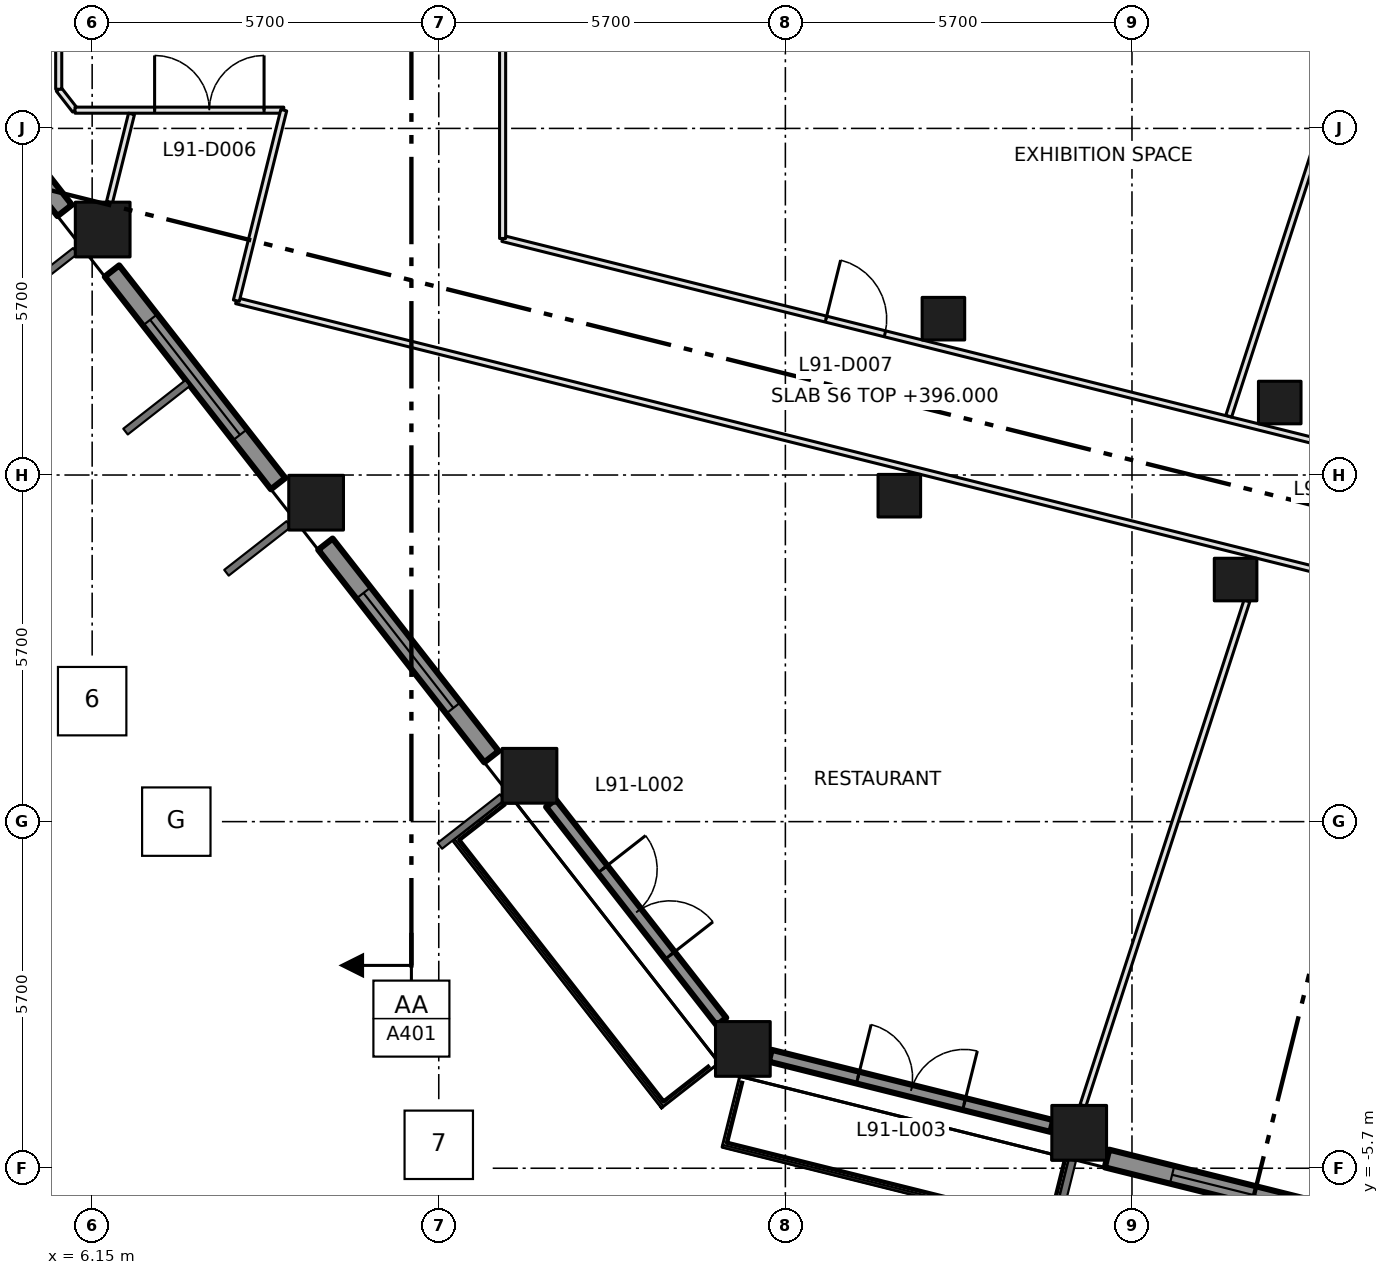
"""IFC4 building model, lengths in metres.
Left out: names, types, materials, properties, quantities, classifications, styles, units other than length and angle.
Written with IfcOpenShell. Run it as: python <this file> out.ifc"""

import sys

from ifc_helpers import new_model, si_unit, direction, frame, frame_2d, origin, origin_2d, place, context, subcontext, project, spatial, rectangle, extrude, element, fill, save


model = new_model("IFC4")
c1 = context("Model", 3, precision=1e-05, world=origin(), true_north=direction((0.0, 1.0)))
c2 = subcontext(c1, "Body", "Model", "MODEL_VIEW")
j1 = project(units=[si_unit("LENGTHUNIT", "METRE"), si_unit("PLANEANGLEUNIT", "RADIAN")], contexts=[c1])
p1 = place(None, origin())
s1 = spatial("IfcSite", under=j1, at=p1, CompositionType="ELEMENT")
p2 = place(p1, origin())
s2 = spatial("IfcBuilding", under=s1, at=p2, CompositionType="ELEMENT")
p3 = place(p2, frame((0.0, 0.0, 396.0)))
s3 = spatial("IfcBuildingStorey", under=s2, at=p3, CompositionType="ELEMENT", Elevation=396.0)
for number, where, z_axis, x_axis in (
    (1, (16.851, -3.738, 0.0), (0.0, 0.0, 1.0), (1.0, 0.0, 0.0)),
    (2, (13.342, 0.754, 0.0), (0.0, 0.0, 1.0), (1.0, 0.0, 0.0)),
    (3, (9.833, 5.245, 0.0), (0.0, 0.0, 1.0), (1.0, 0.0, 0.0)),
    (4, (6.323, 9.737, 0.0), (0.0, 0.0, 1.0), (1.0, 0.0, 0.0)),
    (5, (22.382, -5.117, 0.0), (0.0, 0.0, 1.0), (1.0, 0.0, 0.0)),
):
    element("IfcColumn", number, at=place(p3, frame(where, z_axis=z_axis, x_axis=x_axis)), inside=s3, PredefinedType="COLUMN", context=c2, shape_type="SweptSolid", body=[
        extrude(rectangle(XDim=0.9, YDim=0.9, at=origin_2d()), origin(), (0.0, 0.0, 1.0), 4.2),
    ])
for number, where, z_axis, x_axis in (
    (6, (19.424, 5.36, 0.0), (0.0, 0.0, 1.0), (1.0, 0.0, 0.0)),
    (7, (24.954, 3.981, 0.0), (0.0, 0.0, 1.0), (1.0, 0.0, 0.0)),
    (8, (20.149, 8.271, 0.0), (0.0, 0.0, 1.0), (1.0, 0.0, 0.0)),
    (9, (25.68, 6.892, 0.0), (0.0, 0.0, 1.0), (1.0, 0.0, 0.0)),
):
    element("IfcColumn", number, at=place(p3, frame(where, z_axis=z_axis, x_axis=x_axis)), inside=s3, PredefinedType="COLUMN", context=c2, shape_type="SweptSolid", body=[
        extrude(rectangle(XDim=0.7, YDim=0.7, at=origin_2d()), origin(), (0.0, 0.0, 1.0), 4.2),
    ])
p4 = place(p3, frame((2.967, 13.547, 0.0), z_axis=(0.0, 0.0, 1.0), x_axis=(0.615486001463, -0.788147817356, 0.0)))
e10 = element("IfcWall", 10, at=p4, inside=s3, PredefinedType="SOLIDWALL", context=c2, shape_type="SweptSolid", body=[
    extrude(rectangle(XDim=4.437, YDim=0.3, at=frame_2d((2.219, 0.0))), origin(), (0.0, 0.0, 1.0), 3.05),
])
p5 = place(p4, frame((1.018, 0.0, 0.8)))
e11 = element("IfcOpeningElement", 11, at=p5, cuts=e10, PredefinedType="OPENING", context=c2, shape_type="SweptSolid", body=[
    extrude(rectangle(XDim=2.4, YDim=1.45, at=frame_2d((1.2, 0.725))), frame((0.0, 0.16, 0.0), z_axis=(0.0, -1.0, 0.0), x_axis=(1.0, 0.0, 0.0)), (0.0, 0.0, 1.0), 0.32),
])
p6 = place(p3, frame((6.476, 9.055, 0.0), z_axis=(0.0, 0.0, 1.0), x_axis=(0.615649380255, -0.788020203162, 0.0)))
e12 = element("IfcWall", 12, at=p6, inside=s3, PredefinedType="SOLIDWALL", context=c2, shape_type="SweptSolid", body=[
    extrude(rectangle(XDim=4.438, YDim=0.3, at=frame_2d((2.219, 0.0))), origin(), (0.0, 0.0, 1.0), 3.05),
])
p7 = place(p6, frame((1.019, 0.0, 0.8)))
e13 = element("IfcOpeningElement", 13, at=p7, cuts=e12, PredefinedType="OPENING", context=c2, shape_type="SweptSolid", body=[
    extrude(rectangle(XDim=2.4, YDim=1.45, at=frame_2d((1.2, 0.725))), frame((0.0, 0.16, 0.0), z_axis=(0.0, -1.0, 0.0), x_axis=(1.0, 0.0, 0.0)), (0.0, 0.0, 1.0), 0.32),
])
p8 = place(p3, frame((9.986, 4.563, 0.0), z_axis=(0.0, 0.0, 1.0), x_axis=(0.615592779411, -0.788064419915, 0.0)))
e14 = element("IfcWall", 14, at=p8, inside=s3, PredefinedType="SOLIDWALL", context=c2, shape_type="SweptSolid", body=[
    extrude(rectangle(XDim=4.436, YDim=0.3, at=frame_2d((2.218, 0.0))), origin(), (0.0, 0.0, 1.0), 3.05),
])
p9 = place(p8, frame((1.018, 0.0, 0.8)))
e15 = element("IfcOpeningElement", 15, at=p9, cuts=e14, PredefinedType="OPENING", context=c2, shape_type="SweptSolid", body=[
    extrude(rectangle(XDim=2.4, YDim=1.45, at=frame_2d((1.2, 0.725))), frame((0.0, 0.16, 0.0), z_axis=(0.0, -1.0, 0.0), x_axis=(1.0, 0.0, 0.0)), (0.0, 0.0, 1.0), 0.32),
])
p10 = place(p3, frame((13.694, 0.304, 0.0), z_axis=(0.0, 0.0, 1.0), x_axis=(0.615460024179, -0.788168103033, 0.0)))
e16 = element("IfcWall", 16, at=p10, inside=s3, PredefinedType="SOLIDWALL", context=c2, shape_type="SweptSolid", body=[
    extrude(rectangle(XDim=4.557, YDim=0.2, at=frame_2d((2.279, 0.0))), origin(), (0.0, 0.0, 1.0), 3.05),
])
p11 = place(p10, frame((1.379, 0.0, 0.0)))
e17 = element("IfcOpeningElement", 17, at=p11, cuts=e16, PredefinedType="OPENING", context=c2, shape_type="SweptSolid", body=[
    extrude(rectangle(XDim=1.8, YDim=2.9, at=frame_2d((0.9, 1.45))), frame((0.0, 0.11, 0.0), z_axis=(0.0, -1.0, 0.0), x_axis=(1.0, 0.0, 0.0)), (0.0, 0.0, 1.0), 0.22),
])
p12 = place(p3, frame((12.398, -0.199, 0.0), z_axis=(0.0, 0.0, 1.0), x_axis=(0.615638738903, -0.788028516719, 0.0)))
e18 = element("IfcWall", 18, at=p12, inside=s3, PredefinedType="SOLIDWALL", context=c2, shape_type="SweptSolid", body=[
    extrude(rectangle(XDim=5.36, YDim=0.4, at=frame_2d((2.68, 0.0))), origin(), (0.0, 0.0, 1.0), 0.3),
])
p13 = place(p3, frame((17.301, -3.85, 0.0), z_axis=(0.0, 0.0, 1.0), x_axis=(0.970286762598, -0.241957844111, 0.0)))
e19 = element("IfcWall", 19, at=p13, inside=s3, PredefinedType="SOLIDWALL", context=c2, shape_type="SweptSolid", body=[
    extrude(rectangle(XDim=4.773, YDim=0.2, at=frame_2d((2.386, 0.0))), origin(), (0.0, 0.0, 1.0), 3.05),
])
p14 = place(p13, frame((1.486, 0.0, 0.0)))
e20 = element("IfcOpeningElement", 20, at=p14, cuts=e19, PredefinedType="OPENING", context=c2, shape_type="SweptSolid", body=[
    extrude(rectangle(XDim=1.8, YDim=2.9, at=frame_2d((0.9, 1.45))), frame((0.0, 0.11, 0.0), z_axis=(0.0, -1.0, 0.0), x_axis=(1.0, 0.0, 0.0)), (0.0, 0.0, 1.0), 0.22),
])
p15 = place(p3, frame((16.694, -5.069, 0.0), z_axis=(0.0, 0.0, 1.0), x_axis=(0.970289679319, -0.241946147329, 0.0)))
e21 = element("IfcWall", 21, at=p15, inside=s3, PredefinedType="SOLIDWALL", context=c2, shape_type="SweptSolid", body=[
    extrude(rectangle(XDim=5.36, YDim=0.4, at=frame_2d((2.68, 0.0))), origin(), (0.0, 0.0, 1.0), 0.3),
])
p16 = place(p3, frame((22.839, -5.54, 0.0), z_axis=(0.0, 0.0, 1.0), x_axis=(0.970282587769, -0.241974585177, 0.0)))
e22 = element("IfcWall", 22, at=p16, inside=s3, PredefinedType="SOLIDWALL", context=c2, shape_type="SweptSolid", body=[
    extrude(rectangle(XDim=4.608, YDim=0.3, at=frame_2d((2.304, 0.0))), origin(), (0.0, 0.0, 1.0), 3.05),
])
p17 = place(p16, frame((1.104, 0.0, 0.8)))
e23 = element("IfcOpeningElement", 23, at=p17, cuts=e22, PredefinedType="OPENING", context=c2, shape_type="SweptSolid", body=[
    extrude(rectangle(XDim=2.4, YDim=1.45, at=frame_2d((1.2, 0.725))), frame((0.0, 0.16, 0.0), z_axis=(0.0, -1.0, 0.0), x_axis=(1.0, 0.0, 0.0)), (0.0, 0.0, 1.0), 0.32),
])
p18 = place(p3, frame((5.6, 12.044, 0.0), z_axis=(0.0, 0.0, 1.0), x_axis=(0.614328236968, -0.789050579661, 0.0)))
e24 = element("IfcWall", 24, at=p18, inside=s3, PredefinedType="PARTITIONING", context=c2, shape_type="SweptSolid", body=[
    extrude(rectangle(XDim=0.436, YDim=0.1, at=frame_2d((0.218, 0.0))), origin(), (0.0, 0.0, 1.0), 3.75),
])
p19 = place(p3, frame((5.6, 39.77, 0.0), z_axis=(0.0, 0.0, 1.0), x_axis=(0.0, -1.0, 0.0)))
e25 = element("IfcWall", 25, at=p19, inside=s3, PredefinedType="PARTITIONING", context=c2, shape_type="SweptSolid", body=[
    extrude(rectangle(XDim=27.726, YDim=0.1, at=frame_2d((13.863, 0.0))), origin(), (0.0, 0.0, 1.0), 3.75),
])
p20 = place(p19, frame((24.295, 0.0, 0.0)))
e26 = element("IfcOpeningElement", 26, at=p20, cuts=e25, PredefinedType="OPENING", context=c2, shape_type="SweptSolid", body=[
    extrude(rectangle(XDim=1.0, YDim=2.1, at=frame_2d((0.5, 1.05))), frame((0.0, 0.06, 0.0), z_axis=(0.0, -1.0, 0.0), x_axis=(1.0, 0.0, 0.0)), (0.0, 0.0, 1.0), 0.12),
])
p21 = place(p19, frame((16.395, 0.0, 0.0)))
e27 = element("IfcOpeningElement", 27, at=p21, cuts=e25, PredefinedType="OPENING", context=c2, shape_type="SweptSolid", body=[
    extrude(rectangle(XDim=1.0, YDim=2.1, at=frame_2d((0.5, 1.05))), frame((0.0, 0.06, 0.0), z_axis=(0.0, -1.0, 0.0), x_axis=(1.0, 0.0, 0.0)), (0.0, 0.0, 1.0), 0.12),
])
p22 = place(p19, frame((7.995, 0.0, 0.0)))
e28 = element("IfcOpeningElement", 28, at=p22, cuts=e25, PredefinedType="OPENING", context=c2, shape_type="SweptSolid", body=[
    extrude(rectangle(XDim=1.0, YDim=2.1, at=frame_2d((0.5, 1.05))), frame((0.0, 0.06, 0.0), z_axis=(0.0, -1.0, 0.0), x_axis=(1.0, 0.0, 0.0)), (0.0, 0.0, 1.0), 0.12),
])
p23 = place(p19, frame((2.38, 0.0, 0.0)))
e29 = element("IfcOpeningElement", 29, at=p23, cuts=e25, PredefinedType="OPENING", context=c2, shape_type="SweptSolid", body=[
    extrude(rectangle(XDim=1.0, YDim=2.1, at=frame_2d((0.5, 1.05))), frame((0.0, 0.06, 0.0), z_axis=(0.0, -1.0, 0.0), x_axis=(1.0, 0.0, 0.0)), (0.0, 0.0, 1.0), 0.12),
])
p24 = place(p3, frame((5.868, 11.7, 0.0), z_axis=(0.0, 0.0, 1.0), x_axis=(1.0, 0.0, 0.0)))
e30 = element("IfcWall", 30, at=p24, inside=s3, PredefinedType="PARTITIONING", context=c2, shape_type="SweptSolid", body=[
    extrude(rectangle(XDim=3.433, YDim=0.1, at=frame_2d((1.717, 0.0))), origin(), (0.0, 0.0, 1.0), 3.75),
])
p25 = place(p24, frame((1.309, 0.0, 0.0)))
e31 = element("IfcOpeningElement", 31, at=p25, cuts=e30, PredefinedType="OPENING", context=c2, shape_type="SweptSolid", body=[
    extrude(rectangle(XDim=1.8, YDim=2.1, at=frame_2d((0.9, 1.05))), frame((0.0, 0.06, 0.0), z_axis=(0.0, -1.0, 0.0), x_axis=(1.0, 0.0, 0.0)), (0.0, 0.0, 1.0), 0.12),
])
p26 = place(p3, frame((8.521, 8.567, 0.0), z_axis=(0.0, 0.0, 1.0), x_axis=(0.970298072542, -0.241912485047, 0.0)))
e32 = element("IfcWall", 32, at=p26, inside=s3, PredefinedType="PARTITIONING", context=c2, shape_type="SweptSolid", body=[
    extrude(rectangle(XDim=39.274, YDim=0.1, at=frame_2d((19.637, 0.0))), origin(), (0.0, 0.0, 1.0), 3.75),
])
p27 = place(p26, frame((24.848, 0.0, 0.0)))
e33 = element("IfcOpeningElement", 33, at=p27, cuts=e32, PredefinedType="OPENING", context=c2, shape_type="SweptSolid", body=[
    extrude(rectangle(XDim=1.8, YDim=2.1, at=frame_2d((0.9, 1.05))), frame((0.0, 0.06, 0.0), z_axis=(0.0, -1.0, 0.0), x_axis=(1.0, 0.0, 0.0)), (0.0, 0.0, 1.0), 0.12),
])
p28 = place(p26, frame((30.448, 0.0, 0.0)))
e34 = element("IfcOpeningElement", 34, at=p28, cuts=e32, PredefinedType="OPENING", context=c2, shape_type="SweptSolid", body=[
    extrude(rectangle(XDim=1.0, YDim=2.1, at=frame_2d((0.5, 1.05))), frame((0.0, 0.06, 0.0), z_axis=(0.0, -1.0, 0.0), x_axis=(1.0, 0.0, 0.0)), (0.0, 0.0, 1.0), 0.12),
])
p29 = place(p3, frame((9.301, 11.7, 0.0), z_axis=(0.0, 0.0, 1.0), x_axis=(-0.241592536742, -0.970377785293, 0.0)))
e35 = element("IfcWall", 35, at=p29, inside=s3, PredefinedType="PARTITIONING", context=c2, shape_type="SweptSolid", body=[
    extrude(rectangle(XDim=3.229, YDim=0.1, at=frame_2d((1.614, 0.0))), origin(), (0.0, 0.0, 1.0), 3.75),
])
p30 = place(p3, frame((12.9, 9.59, 0.0), z_axis=(0.0, 0.0, 1.0), x_axis=(0.970296971371, -0.241916901741, 0.0)))
e36 = element("IfcWall", 36, at=p30, inside=s3, PredefinedType="PARTITIONING", context=c2, shape_type="SweptSolid", body=[
    extrude(rectangle(XDim=15.878, YDim=0.1, at=frame_2d((7.939, 0.0))), origin(), (0.0, 0.0, 1.0), 3.75),
])
p31 = place(p30, frame((5.48, 0.0, 0.0)))
e37 = element("IfcOpeningElement", 37, at=p31, cuts=e36, PredefinedType="OPENING", context=c2, shape_type="SweptSolid", body=[
    extrude(rectangle(XDim=1.0, YDim=2.1, at=frame_2d((0.5, 1.05))), frame((0.0, 0.06, 0.0), z_axis=(0.0, -1.0, 0.0), x_axis=(1.0, 0.0, 0.0)), (0.0, 0.0, 1.0), 0.12),
])
p32 = place(p30, frame((13.869, 0.0, 0.0)))
e38 = element("IfcOpeningElement", 38, at=p32, cuts=e36, PredefinedType="OPENING", context=c2, shape_type="SweptSolid", body=[
    extrude(rectangle(XDim=1.0, YDim=2.1, at=frame_2d((0.5, 1.05))), frame((0.0, 0.06, 0.0), z_axis=(0.0, -1.0, 0.0), x_axis=(1.0, 0.0, 0.0)), (0.0, 0.0, 1.0), 0.12),
])
p33 = place(p3, frame((12.9, 9.59, 0.0), z_axis=(0.0, 0.0, 1.0), x_axis=(0.0, 1.0, 0.0)))
e39 = element("IfcWall", 39, at=p33, inside=s3, PredefinedType="PARTITIONING", context=c2, shape_type="SweptSolid", body=[
    extrude(rectangle(XDim=4.51, YDim=0.1, at=frame_2d((2.255, 0.0))), origin(), (0.0, 0.0, 1.0), 3.75),
])
p34 = place(p3, frame((6.797, 11.638, 0.0), z_axis=(0.0, 0.0, 1.0), x_axis=(-0.242113049408, -0.970248046278, 0.0)))
e40 = element("IfcWall", 40, at=p34, inside=s3, PredefinedType="PARTITIONING", context=c2, shape_type="SweptSolid", body=[
    extrude(rectangle(XDim=1.495, YDim=0.1, at=frame_2d((0.748, 0.0))), origin(), (0.0, 0.0, 1.0), 3.75),
])
p35 = place(p3, frame((22.444, -4.667, 0.0), z_axis=(0.0, 0.0, 1.0), x_axis=(0.308974080069, 0.951070458928, 0.0)))
e41 = element("IfcWall", 41, at=p35, inside=s3, PredefinedType="PARTITIONING", context=c2, shape_type="SweptSolid", body=[
    extrude(rectangle(XDim=8.725, YDim=0.1, at=frame_2d((4.363, 0.0))), origin(), (0.0, 0.0, 1.0), 3.75),
])
p36 = place(p3, frame((24.841, 6.668, 0.0), z_axis=(0.0, 0.0, 1.0), x_axis=(0.308898149954, 0.951095122979, 0.0)))
e42 = element("IfcWall", 42, at=p36, inside=s3, PredefinedType="PARTITIONING", context=c2, shape_type="SweptSolid", body=[
    extrude(rectangle(XDim=7.814, YDim=0.1, at=frame_2d((3.907, 0.0))), origin(), (0.0, 0.0, 1.0), 3.75),
])
p37 = place(p7, origin())
e43 = element("IfcWindow", 43, at=p37, inside=s3, PartitioningType="DOUBLE_PANEL_VERTICAL", PredefinedType="WINDOW", context=c2, shape_type="SweptSolid", body=[
    extrude(rectangle(XDim=2.4, YDim=1.45, at=frame_2d((1.2, 0.725))), frame((0.0, 0.03, 0.0), z_axis=(0.0, -1.0, 0.0), x_axis=(1.0, 0.0, 0.0)), (0.0, 0.0, 1.0), 0.06),
])
fill(e13, e43)
p38 = place(p9, origin())
e44 = element("IfcWindow", 44, at=p38, inside=s3, PartitioningType="DOUBLE_PANEL_VERTICAL", PredefinedType="WINDOW", context=c2, shape_type="SweptSolid", body=[
    extrude(rectangle(XDim=2.4, YDim=1.45, at=frame_2d((1.2, 0.725))), frame((0.0, 0.03, 0.0), z_axis=(0.0, -1.0, 0.0), x_axis=(1.0, 0.0, 0.0)), (0.0, 0.0, 1.0), 0.06),
])
fill(e15, e44)
p39 = place(p11, origin())
e45 = element("IfcDoor", 45, at=p39, inside=s3, OperationType="DOUBLE_DOOR_SINGLE_SWING", PredefinedType="DOOR", context=c2, shape_type="SweptSolid", body=[
    extrude(rectangle(XDim=1.8, YDim=2.9, at=frame_2d((0.9, 1.45))), frame((0.0, 0.025, 0.0), z_axis=(0.0, -1.0, 0.0), x_axis=(1.0, 0.0, 0.0)), (0.0, 0.0, 1.0), 0.05),
])
fill(e17, e45)
p40 = place(p14, origin())
e46 = element("IfcDoor", 46, at=p40, inside=s3, OperationType="DOUBLE_DOOR_SINGLE_SWING", PredefinedType="DOOR", context=c2, shape_type="SweptSolid", body=[
    extrude(rectangle(XDim=1.8, YDim=2.9, at=frame_2d((0.9, 1.45))), frame((0.0, 0.025, 0.0), z_axis=(0.0, -1.0, 0.0), x_axis=(1.0, 0.0, 0.0)), (0.0, 0.0, 1.0), 0.05),
])
fill(e20, e46)
p41 = place(p17, origin())
e47 = element("IfcWindow", 47, at=p41, inside=s3, PartitioningType="DOUBLE_PANEL_VERTICAL", PredefinedType="WINDOW", context=c2, shape_type="SweptSolid", body=[
    extrude(rectangle(XDim=2.4, YDim=1.45, at=frame_2d((1.2, 0.725))), frame((0.0, 0.03, 0.0), z_axis=(0.0, -1.0, 0.0), x_axis=(1.0, 0.0, 0.0)), (0.0, 0.0, 1.0), 0.06),
])
fill(e23, e47)
p42 = place(p25, origin())
e48 = element("IfcDoor", 48, at=p42, inside=s3, OperationType="DOUBLE_DOOR_SINGLE_SWING", PredefinedType="DOOR", context=c2, shape_type="SweptSolid", body=[
    extrude(rectangle(XDim=1.8, YDim=2.1, at=frame_2d((0.9, 1.05))), frame((0.0, 0.025, 0.0), z_axis=(0.0, -1.0, 0.0), x_axis=(1.0, 0.0, 0.0)), (0.0, 0.0, 1.0), 0.05),
])
fill(e31, e48)
p43 = place(p31, origin())
e49 = element("IfcDoor", 49, at=p43, inside=s3, OperationType="SINGLE_SWING_LEFT", PredefinedType="DOOR", context=c2, shape_type="SweptSolid", body=[
    extrude(rectangle(XDim=1.0, YDim=2.1, at=frame_2d((0.5, 1.05))), frame((0.0, 0.025, 0.0), z_axis=(0.0, -1.0, 0.0), x_axis=(1.0, 0.0, 0.0)), (0.0, 0.0, 1.0), 0.05),
])
fill(e37, e49)
save(model, sys.argv[1])
